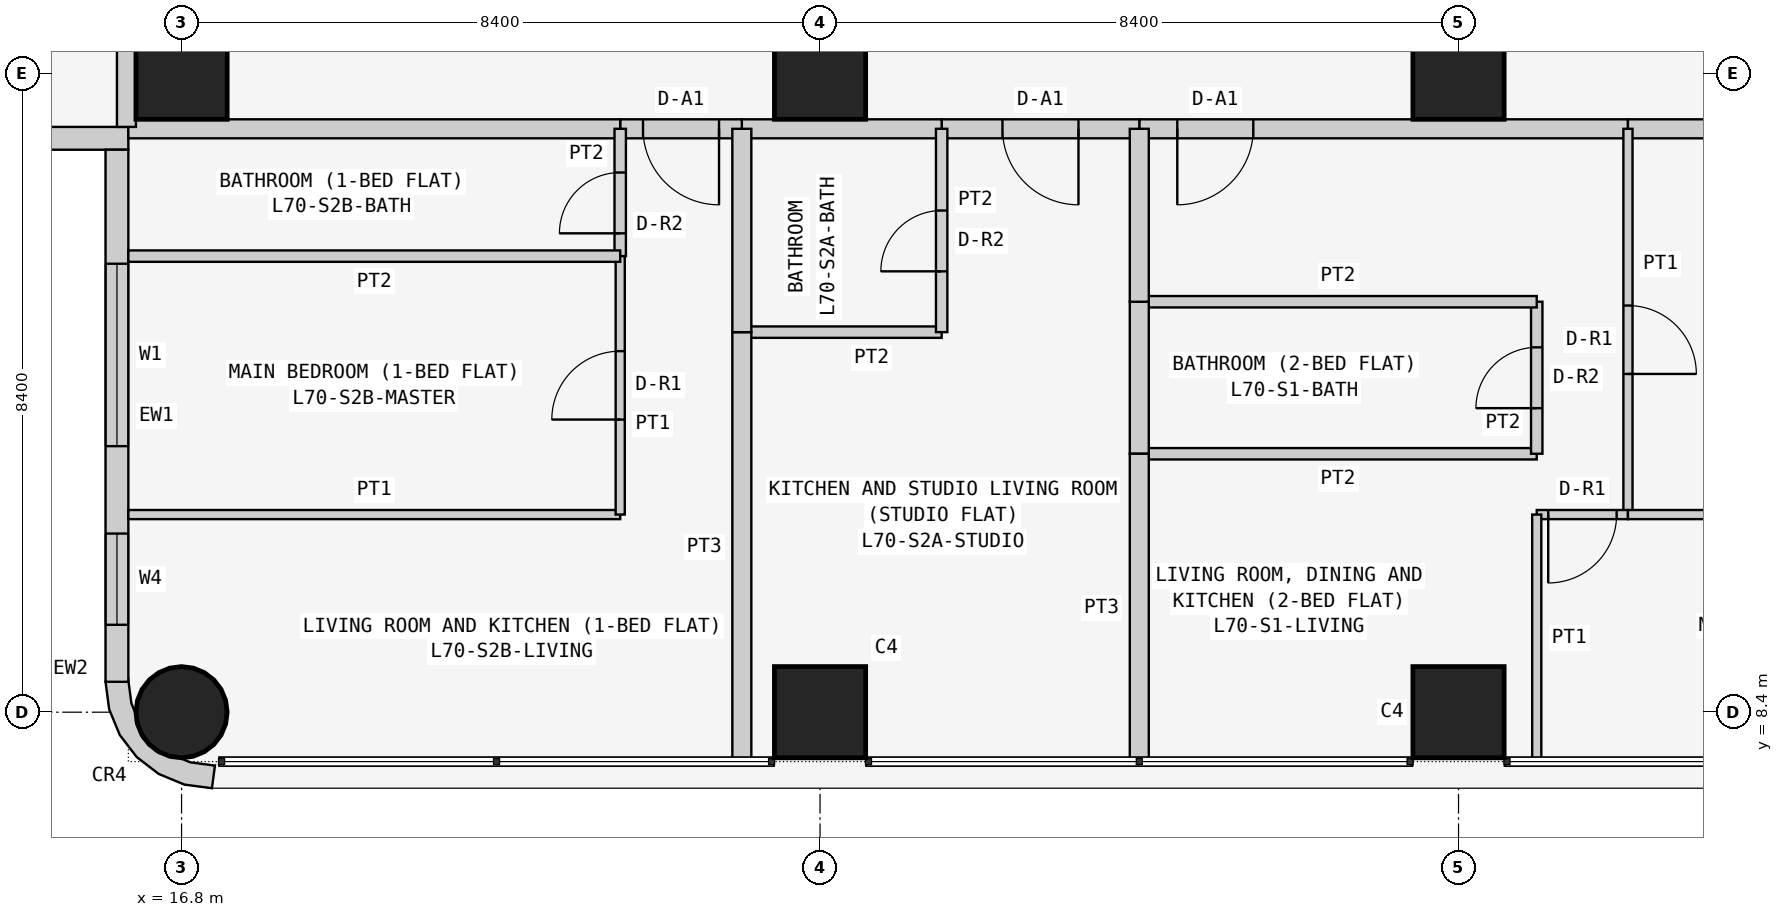
"""IFC4 building model, lengths in metres.
Left out: names, types, materials, properties, quantities, classifications, styles, units other than length and angle.
Written with IfcOpenShell. Run it as: python <this file> out.ifc"""

import sys

from ifc_helpers import new_model, si_unit, direction, frame, frame_2d, origin, origin_2d, place, context, subcontext, project, spatial, polyline, rectangle, circle, outline, extrude, element, fill, save


model = new_model("IFC4")
c1 = context("Model", 3, precision=1e-05, world=origin(), true_north=direction((0.0, 1.0)))
c2 = subcontext(c1, "Body", "Model", "MODEL_VIEW")
j1 = project(units=[si_unit("LENGTHUNIT", "METRE"), si_unit("PLANEANGLEUNIT", "RADIAN")], contexts=[c1])
p1 = place(None, origin())
s1 = spatial("IfcSite", under=j1, at=p1, CompositionType="ELEMENT")
p2 = place(p1, origin())
s2 = spatial("IfcBuilding", under=s1, at=p2, CompositionType="ELEMENT")
p3 = place(p2, frame((0.0, 0.0, 268.5)))
s3 = spatial("IfcBuildingStorey", under=s2, at=p3, CompositionType="ELEMENT", Elevation=268.5)
p4 = place(p3, frame((16.8, 8.4, 0.0), z_axis=(0.0, 0.0, 1.0), x_axis=(1.0, 0.0, 0.0)))
e1 = element("IfcColumn", 1, at=p4, inside=s3, PredefinedType="COLUMN", context=c2, shape_type="SweptSolid", body=[
    extrude(circle(Radius=0.6, at=origin_2d()), origin(), (0.0, 0.0, 1.0), 3.6),
])
for number, where, z_axis, x_axis in (
    (2, (16.8, 16.8, 0.0), (0.0, 0.0, 1.0), (1.0, 0.0, 0.0)),
    (3, (25.2, 8.4, 0.0), (0.0, 0.0, 1.0), (1.0, 0.0, 0.0)),
    (4, (25.2, 16.8, 0.0), (0.0, 0.0, 1.0), (1.0, 0.0, 0.0)),
    (5, (33.6, 8.4, 0.0), (0.0, 0.0, 1.0), (1.0, 0.0, 0.0)),
    (6, (33.6, 16.8, 0.0), (0.0, 0.0, 1.0), (1.0, 0.0, 0.0)),
):
    element("IfcColumn", number, at=place(p3, frame(where, z_axis=z_axis, x_axis=x_axis)), inside=s3, PredefinedType="COLUMN", context=c2, shape_type="SweptSolid", body=[
        extrude(rectangle(XDim=1.2, YDim=1.2, at=origin_2d()), origin(), (0.0, 0.0, 1.0), 3.6),
    ])
p5 = place(p3, frame((8.8, 15.95, 0.0), z_axis=(0.0, 0.0, 1.0), x_axis=(1.0, 0.0, 0.0)))
e7 = element("IfcWall", 7, at=p5, inside=s3, PredefinedType="SOLIDWALL", context=c2, shape_type="SweptSolid", body=[
    extrude(rectangle(XDim=7.3, YDim=0.3, at=frame_2d((3.65, 0.0))), origin(), (0.0, 0.0, 1.0), 3.45),
])
p6 = place(p5, frame((3.1, 0.0, 0.9)))
e8 = element("IfcOpeningElement", 8, at=p6, cuts=e7, PredefinedType="OPENING", context=c2, shape_type="SweptSolid", body=[
    extrude(rectangle(XDim=2.4, YDim=1.5, at=frame_2d((1.2, 0.75))), frame((0.0, 0.16, 0.0), z_axis=(0.0, -1.0, 0.0), x_axis=(1.0, 0.0, 0.0)), (0.0, 0.0, 1.0), 0.32),
])
p7 = place(p5, frame((0.75, 0.0, 0.9)))
e9 = element("IfcOpeningElement", 9, at=p7, cuts=e7, PredefinedType="OPENING", context=c2, shape_type="SweptSolid", body=[
    extrude(rectangle(XDim=1.2, YDim=1.5, at=frame_2d((0.6, 0.75))), frame((0.0, 0.16, 0.0), z_axis=(0.0, -1.0, 0.0), x_axis=(1.0, 0.0, 0.0)), (0.0, 0.0, 1.0), 0.32),
])
p8 = place(p3, frame((15.95, 15.8, 0.0), z_axis=(0.0, 0.0, 1.0), x_axis=(0.0, -1.0, 0.0)))
e10 = element("IfcWall", 10, at=p8, inside=s3, PredefinedType="SOLIDWALL", context=c2, shape_type="SweptSolid", body=[
    extrude(rectangle(XDim=7.0, YDim=0.3, at=frame_2d((3.5, 0.0))), origin(), (0.0, 0.0, 1.0), 3.45),
])
p9 = place(p8, frame((1.5, 0.0, 0.9)))
e11 = element("IfcOpeningElement", 11, at=p9, cuts=e10, PredefinedType="OPENING", context=c2, shape_type="SweptSolid", body=[
    extrude(rectangle(XDim=2.4, YDim=1.5, at=frame_2d((1.2, 0.75))), frame((0.0, 0.16, 0.0), z_axis=(0.0, -1.0, 0.0), x_axis=(1.0, 0.0, 0.0)), (0.0, 0.0, 1.0), 0.32),
])
p10 = place(p8, frame((5.05, 0.0, 0.9)))
e12 = element("IfcOpeningElement", 12, at=p10, cuts=e10, PredefinedType="OPENING", context=c2, shape_type="SweptSolid", body=[
    extrude(rectangle(XDim=1.2, YDim=1.5, at=frame_2d((0.6, 0.75))), frame((0.0, 0.16, 0.0), z_axis=(0.0, -1.0, 0.0), x_axis=(1.0, 0.0, 0.0)), (0.0, 0.0, 1.0), 0.32),
])
p11 = place(p3, frame((16.224, 8.762, 0.0), z_axis=(0.0, 0.0, 1.0), x_axis=(-0.707106781187, -0.707106781187, 0.0)))
e13 = element("IfcWall", 13, at=p11, inside=s3, PredefinedType="SOLIDWALL", context=c2, shape_type="SweptSolid", body=[
    extrude(outline(polyline([(0.033, 1.469), (0.047, 1.455), (0.233, 1.212), (0.292, 1.069), (0.358, 1.003), (0.449, 0.783), (0.449, 0.543), (0.358, 0.322), (0.292, 0.257), (0.233, 0.114), (0.047, -0.129), (0.033, -0.143), (0.273, -0.327), (0.495, -0.037), (0.635, 0.3), (0.683, 0.663), (0.635, 1.025), (0.495, 1.363), (0.273, 1.653), (0.033, 1.469)])), origin(), (0.0, 0.0, 1.0), 3.45),
])
p12 = place(p3, frame((35.829, 16.075, 0.0), z_axis=(0.0, 0.0, 1.0), x_axis=(-1.0, 0.0, 0.0)))
e14 = element("IfcWall", 14, at=p12, inside=s3, PredefinedType="PARTITIONING", context=c2, shape_type="SweptSolid", body=[
    extrude(rectangle(XDim=6.429, YDim=0.25, at=frame_2d((3.215, 0.0))), origin(), (0.0, 0.0, 1.0), 3.45),
])
p13 = place(p12, frame((4.929, 0.0, 0.0)))
e15 = element("IfcOpeningElement", 15, at=p13, cuts=e14, PredefinedType="OPENING", context=c2, shape_type="SweptSolid", body=[
    extrude(rectangle(XDim=1.0, YDim=2.1, at=frame_2d((0.5, 1.05))), frame((0.0, 0.135, 0.0), z_axis=(0.0, -1.0, 0.0), x_axis=(1.0, 0.0, 0.0)), (0.0, 0.0, 1.0), 0.27),
])
p14 = place(p3, frame((42.7, 16.075, 0.0), z_axis=(0.0, 0.0, 1.0), x_axis=(-1.0, 0.0, 0.0)))
e16 = element("IfcWall", 16, at=p14, inside=s3, PredefinedType="PARTITIONING", context=c2, shape_type="SweptSolid", body=[
    extrude(rectangle(XDim=6.871, YDim=0.25, at=frame_2d((3.436, 0.0))), origin(), (0.0, 0.0, 1.0), 3.45),
])
p15 = place(p3, frame((29.4, 16.075, 0.0), z_axis=(0.0, 0.0, 1.0), x_axis=(-1.0, 0.0, 0.0)))
e17 = element("IfcWall", 17, at=p15, inside=s3, PredefinedType="PARTITIONING", context=c2, shape_type="SweptSolid", body=[
    extrude(rectangle(XDim=2.6, YDim=0.25, at=frame_2d((1.3, 0.0))), origin(), (0.0, 0.0, 1.0), 3.45),
])
p16 = place(p15, frame((0.8, 0.0, 0.0)))
e18 = element("IfcOpeningElement", 18, at=p16, cuts=e17, PredefinedType="OPENING", context=c2, shape_type="SweptSolid", body=[
    extrude(rectangle(XDim=1.0, YDim=2.1, at=frame_2d((0.5, 1.05))), frame((0.0, 0.135, 0.0), z_axis=(0.0, -1.0, 0.0), x_axis=(1.0, 0.0, 0.0)), (0.0, 0.0, 1.0), 0.27),
])
p17 = place(p3, frame((26.8, 16.075, 0.0), z_axis=(0.0, 0.0, 1.0), x_axis=(-1.0, 0.0, 0.0)))
e19 = element("IfcWall", 19, at=p17, inside=s3, PredefinedType="PARTITIONING", context=c2, shape_type="SweptSolid", body=[
    extrude(rectangle(XDim=2.629, YDim=0.25, at=frame_2d((1.314, 0.0))), origin(), (0.0, 0.0, 1.0), 3.45),
])
p18 = place(p3, frame((24.171, 16.075, 0.0), z_axis=(0.0, 0.0, 1.0), x_axis=(-1.0, 0.0, 0.0)))
e20 = element("IfcWall", 20, at=p18, inside=s3, PredefinedType="PARTITIONING", context=c2, shape_type="SweptSolid", body=[
    extrude(rectangle(XDim=1.6, YDim=0.25, at=frame_2d((0.8, 0.0))), origin(), (0.0, 0.0, 1.0), 3.45),
])
p19 = place(p18, frame((0.3, 0.0, 0.0)))
e21 = element("IfcOpeningElement", 21, at=p19, cuts=e20, PredefinedType="OPENING", context=c2, shape_type="SweptSolid", body=[
    extrude(rectangle(XDim=1.0, YDim=2.1, at=frame_2d((0.5, 1.05))), frame((0.0, 0.135, 0.0), z_axis=(0.0, -1.0, 0.0), x_axis=(1.0, 0.0, 0.0)), (0.0, 0.0, 1.0), 0.27),
])
p20 = place(p3, frame((22.571, 16.075, 0.0), z_axis=(0.0, 0.0, 1.0), x_axis=(-1.0, 0.0, 0.0)))
e22 = element("IfcWall", 22, at=p20, inside=s3, PredefinedType="PARTITIONING", context=c2, shape_type="SweptSolid", body=[
    extrude(rectangle(XDim=6.471, YDim=0.25, at=frame_2d((3.235, 0.0))), origin(), (0.0, 0.0, 1.0), 3.45),
])
p21 = place(p3, frame((16.075, 16.1, 0.0), z_axis=(0.0, 0.0, 1.0), x_axis=(0.0, 1.0, 0.0)))
e23 = element("IfcWall", 23, at=p21, inside=s3, PredefinedType="PARTITIONING", context=c2, shape_type="SweptSolid", body=[
    extrude(rectangle(XDim=6.871, YDim=0.25, at=frame_2d((3.436, 0.0))), origin(), (0.0, 0.0, 1.0), 3.45),
])
p22 = place(p3, frame((29.4, 11.8, 0.0), z_axis=(0.0, 0.0, 1.0), x_axis=(1.0, 0.0, 0.0)))
e24 = element("IfcWall", 24, at=p22, inside=s3, PredefinedType="PARTITIONING", context=c2, shape_type="SweptSolid", body=[
    extrude(rectangle(XDim=5.229, YDim=0.15, at=frame_2d((2.615, 0.0))), origin(), (0.0, 0.0, 1.0), 3.45),
])
p23 = place(p3, frame((34.629, 11.8, 0.0), z_axis=(0.0, 0.0, 1.0), x_axis=(0.0, 1.0, 0.0)))
e25 = element("IfcWall", 25, at=p23, inside=s3, PredefinedType="PARTITIONING", context=c2, shape_type="SweptSolid", body=[
    extrude(rectangle(XDim=2.0, YDim=0.15, at=frame_2d((1.0, 0.0))), origin(), (0.0, 0.0, 1.0), 3.45),
])
p24 = place(p23, frame((0.6, 0.0, 0.0)))
e26 = element("IfcOpeningElement", 26, at=p24, cuts=e25, PredefinedType="OPENING", context=c2, shape_type="SweptSolid", body=[
    extrude(rectangle(XDim=0.8, YDim=2.1, at=frame_2d((0.4, 1.05))), frame((0.0, 0.085, 0.0), z_axis=(0.0, -1.0, 0.0), x_axis=(1.0, 0.0, 0.0)), (0.0, 0.0, 1.0), 0.17),
])
p25 = place(p3, frame((34.629, 13.8, 0.0), z_axis=(0.0, 0.0, 1.0), x_axis=(-1.0, 0.0, 0.0)))
e27 = element("IfcWall", 27, at=p25, inside=s3, PredefinedType="PARTITIONING", context=c2, shape_type="SweptSolid", body=[
    extrude(rectangle(XDim=5.229, YDim=0.15, at=frame_2d((2.615, 0.0))), origin(), (0.0, 0.0, 1.0), 3.45),
])
p26 = place(p3, frame((29.4, 13.8, 0.0), z_axis=(0.0, 0.0, 1.0), x_axis=(0.0, -1.0, 0.0)))
e28 = element("IfcWall", 28, at=p26, inside=s3, PredefinedType="PARTITIONING", context=c2, shape_type="SweptSolid", body=[
    extrude(rectangle(XDim=2.0, YDim=0.25, at=frame_2d((1.0, 0.0))), origin(), (0.0, 0.0, 1.0), 2.848),
])
p27 = place(p3, frame((35.829, 16.075, 0.0), z_axis=(0.0, 0.0, 1.0), x_axis=(0.0, -1.0, 0.0)))
e29 = element("IfcWall", 29, at=p27, inside=s3, PredefinedType="PARTITIONING", context=c2, shape_type="SweptSolid", body=[
    extrude(rectangle(XDim=5.075, YDim=0.12, at=frame_2d((2.538, 0.0))), origin(), (0.0, 0.0, 1.0), 3.45),
])
p28 = place(p27, frame((2.325, 0.0, 0.0)))
e30 = element("IfcOpeningElement", 30, at=p28, cuts=e29, PredefinedType="OPENING", context=c2, shape_type="SweptSolid", body=[
    extrude(rectangle(XDim=0.9, YDim=2.1, at=frame_2d((0.45, 1.05))), frame((0.0, 0.07, 0.0), z_axis=(0.0, -1.0, 0.0), x_axis=(1.0, 0.0, 0.0)), (0.0, 0.0, 1.0), 0.14),
])
p29 = place(p3, frame((35.829, 11.0, 0.0), z_axis=(0.0, 0.0, 1.0), x_axis=(-1.0, 0.0, 0.0)))
e31 = element("IfcWall", 31, at=p29, inside=s3, PredefinedType="PARTITIONING", context=c2, shape_type="SweptSolid", body=[
    extrude(rectangle(XDim=1.2, YDim=0.12, at=frame_2d((0.6, 0.0))), origin(), (0.0, 0.0, 1.0), 3.45),
])
p30 = place(p29, frame((0.149, 0.0, 0.0)))
e32 = element("IfcOpeningElement", 32, at=p30, cuts=e31, PredefinedType="OPENING", context=c2, shape_type="SweptSolid", body=[
    extrude(rectangle(XDim=0.9, YDim=2.1, at=frame_2d((0.45, 1.05))), frame((0.0, 0.07, 0.0), z_axis=(0.0, -1.0, 0.0), x_axis=(1.0, 0.0, 0.0)), (0.0, 0.0, 1.0), 0.14),
])
p31 = place(p3, frame((34.629, 11.0, 0.0), z_axis=(0.0, 0.0, 1.0), x_axis=(0.0, -1.0, 0.0)))
e33 = element("IfcWall", 33, at=p31, inside=s3, PredefinedType="PARTITIONING", context=c2, shape_type="SweptSolid", body=[
    extrude(rectangle(XDim=3.25, YDim=0.12, at=frame_2d((1.625, 0.0))), origin(), (0.0, 0.0, 1.0), 3.45),
])
p32 = place(p3, frame((29.4, 7.75, 0.0), z_axis=(0.0, 0.0, 1.0), x_axis=(0.0, 1.0, 0.0)))
e34 = element("IfcWall", 34, at=p32, inside=s3, PredefinedType="PARTITIONING", context=c2, shape_type="SweptSolid", body=[
    extrude(rectangle(XDim=4.05, YDim=0.25, at=frame_2d((2.025, 0.0))), origin(), (0.0, 0.0, 1.0), 2.848),
])
p33 = place(p3, frame((29.4, 13.8, 0.0), z_axis=(0.0, 0.0, 1.0), x_axis=(0.0, 1.0, 0.0)))
e35 = element("IfcWall", 35, at=p33, inside=s3, PredefinedType="PARTITIONING", context=c2, shape_type="SweptSolid", body=[
    extrude(rectangle(XDim=2.275, YDim=0.25, at=frame_2d((1.137, 0.0))), origin(), (0.0, 0.0, 1.0), 2.848),
])
p34 = place(p3, frame((35.829, 11.0, 0.0), z_axis=(0.0, 0.0, 1.0), x_axis=(1.0, 0.0, 0.0)))
e36 = element("IfcWall", 36, at=p34, inside=s3, PredefinedType="PARTITIONING", context=c2, shape_type="SweptSolid", body=[
    extrude(rectangle(XDim=6.871, YDim=0.12, at=frame_2d((3.436, 0.0))), origin(), (0.0, 0.0, 1.0), 3.45),
])
p35 = place(p3, frame((24.171, 13.4, 0.0), z_axis=(0.0, 0.0, 1.0), x_axis=(1.0, 0.0, 0.0)))
e37 = element("IfcWall", 37, at=p35, inside=s3, PredefinedType="PARTITIONING", context=c2, shape_type="SweptSolid", body=[
    extrude(rectangle(XDim=2.629, YDim=0.15, at=frame_2d((1.314, 0.0))), origin(), (0.0, 0.0, 1.0), 3.45),
])
p36 = place(p3, frame((26.8, 13.4, 0.0), z_axis=(0.0, 0.0, 1.0), x_axis=(0.0, 1.0, 0.0)))
e38 = element("IfcWall", 38, at=p36, inside=s3, PredefinedType="PARTITIONING", context=c2, shape_type="SweptSolid", body=[
    extrude(rectangle(XDim=2.675, YDim=0.15, at=frame_2d((1.337, 0.0))), origin(), (0.0, 0.0, 1.0), 3.45),
])
p37 = place(p36, frame((0.8, 0.0, 0.0)))
e39 = element("IfcOpeningElement", 39, at=p37, cuts=e38, PredefinedType="OPENING", context=c2, shape_type="SweptSolid", body=[
    extrude(rectangle(XDim=0.8, YDim=2.1, at=frame_2d((0.4, 1.05))), frame((0.0, 0.085, 0.0), z_axis=(0.0, -1.0, 0.0), x_axis=(1.0, 0.0, 0.0)), (0.0, 0.0, 1.0), 0.17),
])
p38 = place(p3, frame((24.171, 7.75, 0.0), z_axis=(0.0, 0.0, 1.0), x_axis=(0.0, 1.0, 0.0)))
e40 = element("IfcWall", 40, at=p38, inside=s3, PredefinedType="PARTITIONING", context=c2, shape_type="SweptSolid", body=[
    extrude(rectangle(XDim=5.65, YDim=0.25, at=frame_2d((2.825, 0.0))), origin(), (0.0, 0.0, 1.0), 3.45),
])
p39 = place(p3, frame((24.171, 13.4, 0.0), z_axis=(0.0, 0.0, 1.0), x_axis=(0.0, 1.0, 0.0)))
e41 = element("IfcWall", 41, at=p39, inside=s3, PredefinedType="PARTITIONING", context=c2, shape_type="SweptSolid", body=[
    extrude(rectangle(XDim=2.675, YDim=0.25, at=frame_2d((1.337, 0.0))), origin(), (0.0, 0.0, 1.0), 3.45),
])
p40 = place(p3, frame((22.571, 14.4, 0.0), z_axis=(0.0, 0.0, 1.0), x_axis=(0.0, 1.0, 0.0)))
e42 = element("IfcWall", 42, at=p40, inside=s3, PredefinedType="PARTITIONING", context=c2, shape_type="SweptSolid", body=[
    extrude(rectangle(XDim=1.675, YDim=0.15, at=frame_2d((0.837, 0.0))), origin(), (0.0, 0.0, 1.0), 3.45),
])
p41 = place(p40, frame((0.3, 0.0, 0.0)))
e43 = element("IfcOpeningElement", 43, at=p41, cuts=e42, PredefinedType="OPENING", context=c2, shape_type="SweptSolid", body=[
    extrude(rectangle(XDim=0.8, YDim=2.1, at=frame_2d((0.4, 1.05))), frame((0.0, 0.085, 0.0), z_axis=(0.0, -1.0, 0.0), x_axis=(1.0, 0.0, 0.0)), (0.0, 0.0, 1.0), 0.17),
])
p42 = place(p3, frame((16.1, 11.0, 0.0), z_axis=(0.0, 0.0, 1.0), x_axis=(1.0, 0.0, 0.0)))
e44 = element("IfcWall", 44, at=p42, inside=s3, PredefinedType="PARTITIONING", context=c2, shape_type="SweptSolid", body=[
    extrude(rectangle(XDim=6.471, YDim=0.12, at=frame_2d((3.235, 0.0))), origin(), (0.0, 0.0, 1.0), 3.45),
])
p43 = place(p3, frame((22.571, 11.0, 0.0), z_axis=(0.0, 0.0, 1.0), x_axis=(0.0, 1.0, 0.0)))
e45 = element("IfcWall", 45, at=p43, inside=s3, PredefinedType="PARTITIONING", context=c2, shape_type="SweptSolid", body=[
    extrude(rectangle(XDim=3.4, YDim=0.12, at=frame_2d((1.7, 0.0))), origin(), (0.0, 0.0, 1.0), 3.45),
])
p44 = place(p43, frame((1.25, 0.0, 0.0)))
e46 = element("IfcOpeningElement", 46, at=p44, cuts=e45, PredefinedType="OPENING", context=c2, shape_type="SweptSolid", body=[
    extrude(rectangle(XDim=0.9, YDim=2.1, at=frame_2d((0.45, 1.05))), frame((0.0, 0.07, 0.0), z_axis=(0.0, -1.0, 0.0), x_axis=(1.0, 0.0, 0.0)), (0.0, 0.0, 1.0), 0.14),
])
p45 = place(p3, frame((22.571, 14.4, 0.0), z_axis=(0.0, 0.0, 1.0), x_axis=(-1.0, 0.0, 0.0)))
e47 = element("IfcWall", 47, at=p45, inside=s3, PredefinedType="PARTITIONING", context=c2, shape_type="SweptSolid", body=[
    extrude(rectangle(XDim=6.471, YDim=0.15, at=frame_2d((3.235, 0.0))), origin(), (0.0, 0.0, 1.0), 3.45),
])
p46 = place(p9, origin())
e48 = element("IfcWindow", 48, at=p46, inside=s3, PartitioningType="SINGLE_PANEL", PredefinedType="WINDOW", context=c2, shape_type="SweptSolid", body=[
    extrude(rectangle(XDim=2.4, YDim=1.5, at=frame_2d((1.2, 0.75))), frame((0.0, 0.03, 0.0), z_axis=(0.0, -1.0, 0.0), x_axis=(1.0, 0.0, 0.0)), (0.0, 0.0, 1.0), 0.06),
])
fill(e11, e48)
p47 = place(p10, origin())
e49 = element("IfcWindow", 49, at=p47, inside=s3, PartitioningType="SINGLE_PANEL", PredefinedType="WINDOW", context=c2, shape_type="SweptSolid", body=[
    extrude(rectangle(XDim=1.2, YDim=1.5, at=frame_2d((0.6, 0.75))), frame((0.0, 0.03, 0.0), z_axis=(0.0, -1.0, 0.0), x_axis=(1.0, 0.0, 0.0)), (0.0, 0.0, 1.0), 0.06),
])
fill(e12, e49)
p48 = place(p13, origin())
e50 = element("IfcDoor", 50, at=p48, inside=s3, OperationType="SINGLE_SWING_RIGHT", PredefinedType="DOOR", context=c2, shape_type="SweptSolid", body=[
    extrude(rectangle(XDim=1.0, YDim=2.1, at=frame_2d((0.5, 1.05))), frame((0.0, 0.025, 0.0), z_axis=(0.0, -1.0, 0.0), x_axis=(1.0, 0.0, 0.0)), (0.0, 0.0, 1.0), 0.05),
])
fill(e15, e50)
p49 = place(p24, origin())
e51 = element("IfcDoor", 51, at=p49, inside=s3, OperationType="SINGLE_SWING_LEFT", PredefinedType="DOOR", context=c2, shape_type="SweptSolid", body=[
    extrude(rectangle(XDim=0.8, YDim=2.1, at=frame_2d((0.4, 1.05))), frame((0.0, 0.025, 0.0), z_axis=(0.0, -1.0, 0.0), x_axis=(1.0, 0.0, 0.0)), (0.0, 0.0, 1.0), 0.05),
])
fill(e26, e51)
p50 = place(p28, origin())
e52 = element("IfcDoor", 52, at=p50, inside=s3, OperationType="SINGLE_SWING_RIGHT", PredefinedType="DOOR", context=c2, shape_type="SweptSolid", body=[
    extrude(rectangle(XDim=0.9, YDim=2.1, at=frame_2d((0.45, 1.05))), frame((0.0, 0.025, 0.0), z_axis=(0.0, -1.0, 0.0), x_axis=(1.0, 0.0, 0.0)), (0.0, 0.0, 1.0), 0.05),
])
fill(e30, e52)
p51 = place(p30, origin())
e53 = element("IfcDoor", 53, at=p51, inside=s3, OperationType="SINGLE_SWING_RIGHT", PredefinedType="DOOR", context=c2, shape_type="SweptSolid", body=[
    extrude(rectangle(XDim=0.9, YDim=2.1, at=frame_2d((0.45, 1.05))), frame((0.0, 0.025, 0.0), z_axis=(0.0, -1.0, 0.0), x_axis=(1.0, 0.0, 0.0)), (0.0, 0.0, 1.0), 0.05),
])
fill(e32, e53)
p52 = place(p16, origin())
e54 = element("IfcDoor", 54, at=p52, inside=s3, OperationType="SINGLE_SWING_LEFT", PredefinedType="DOOR", context=c2, shape_type="SweptSolid", body=[
    extrude(rectangle(XDim=1.0, YDim=2.1, at=frame_2d((0.5, 1.05))), frame((0.0, 0.025, 0.0), z_axis=(0.0, -1.0, 0.0), x_axis=(1.0, 0.0, 0.0)), (0.0, 0.0, 1.0), 0.05),
])
fill(e18, e54)
p53 = place(p37, origin())
e55 = element("IfcDoor", 55, at=p53, inside=s3, OperationType="SINGLE_SWING_LEFT", PredefinedType="DOOR", context=c2, shape_type="SweptSolid", body=[
    extrude(rectangle(XDim=0.8, YDim=2.1, at=frame_2d((0.4, 1.05))), frame((0.0, 0.025, 0.0), z_axis=(0.0, -1.0, 0.0), x_axis=(1.0, 0.0, 0.0)), (0.0, 0.0, 1.0), 0.05),
])
fill(e39, e55)
p54 = place(p19, origin())
e56 = element("IfcDoor", 56, at=p54, inside=s3, OperationType="SINGLE_SWING_LEFT", PredefinedType="DOOR", context=c2, shape_type="SweptSolid", body=[
    extrude(rectangle(XDim=1.0, YDim=2.1, at=frame_2d((0.5, 1.05))), frame((0.0, 0.025, 0.0), z_axis=(0.0, -1.0, 0.0), x_axis=(1.0, 0.0, 0.0)), (0.0, 0.0, 1.0), 0.05),
])
fill(e21, e56)
p55 = place(p41, origin())
e57 = element("IfcDoor", 57, at=p55, inside=s3, OperationType="SINGLE_SWING_LEFT", PredefinedType="DOOR", context=c2, shape_type="SweptSolid", body=[
    extrude(rectangle(XDim=0.8, YDim=2.1, at=frame_2d((0.4, 1.05))), frame((0.0, 0.025, 0.0), z_axis=(0.0, -1.0, 0.0), x_axis=(1.0, 0.0, 0.0)), (0.0, 0.0, 1.0), 0.05),
])
fill(e43, e57)
p56 = place(p44, origin())
e58 = element("IfcDoor", 58, at=p56, inside=s3, OperationType="SINGLE_SWING_LEFT", PredefinedType="DOOR", context=c2, shape_type="SweptSolid", body=[
    extrude(rectangle(XDim=0.9, YDim=2.1, at=frame_2d((0.45, 1.05))), frame((0.0, 0.025, 0.0), z_axis=(0.0, -1.0, 0.0), x_axis=(1.0, 0.0, 0.0)), (0.0, 0.0, 1.0), 0.05),
])
fill(e46, e58)
save(model, sys.argv[1])
